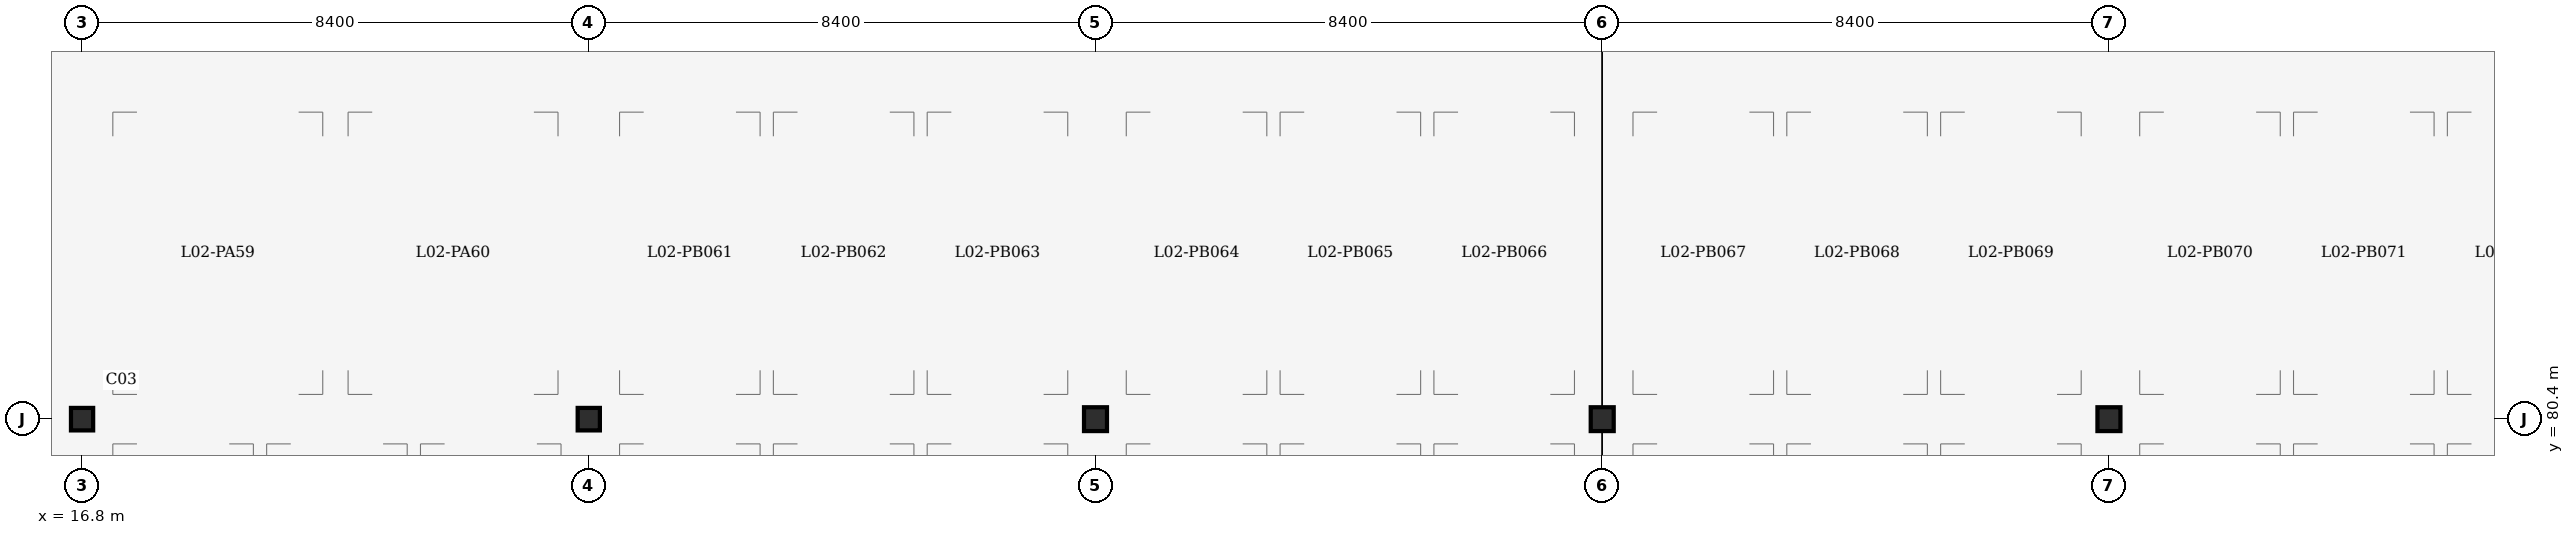
"""IFC4 building model, lengths in metres.
Left out: names, types, materials, properties, quantities, classifications, styles, units other than length and angle.
Written with IfcOpenShell. Run it as: python <this file> out.ifc"""

import sys

from ifc_helpers import new_model, si_unit, direction, frame, origin, origin_2d, place, context, subcontext, project, spatial, i_section, extrude, element, save


model = new_model("IFC4")
c1 = context("Model", 3, precision=1e-05, world=origin(), true_north=direction((0.0, 1.0)))
c2 = subcontext(c1, "Body", "Model", "MODEL_VIEW")
j1 = project(units=[si_unit("LENGTHUNIT", "METRE"), si_unit("PLANEANGLEUNIT", "RADIAN")], contexts=[c1])
p1 = place(None, origin())
s1 = spatial("IfcSite", under=j1, at=p1, CompositionType="ELEMENT")
p2 = place(p1, origin())
s2 = spatial("IfcBuilding", under=s1, at=p2, CompositionType="ELEMENT")
p3 = place(p2, frame((0.0, 0.0, 9.0)))
s3 = spatial("IfcBuildingStorey", under=s2, at=p3, CompositionType="ELEMENT", Elevation=9.0)
for number, where, z_axis, x_axis in (
    (1, (16.8, 80.4, 0.0), (0.0, 0.0, 1.0), (1.0, 0.0, 0.0)),
    (2, (25.2, 80.4, 0.0), (0.0, 0.0, 1.0), (1.0, 0.0, 0.0)),
):
    element("IfcColumn", number, at=place(p3, frame(where, z_axis=z_axis, x_axis=x_axis)), inside=s3, PredefinedType="COLUMN", context=c2, shape_type="SweptSolid", body=[
        extrude(i_section(OverallWidth=0.373, OverallDepth=0.368, WebThickness=0.014, FlangeThickness=0.024, FilletRadius=0.015, at=origin_2d()), origin(), (0.0, 0.0, 1.0), 3.6),
    ])
for number, where, z_axis, x_axis in (
    (3, (33.6, 80.4, 0.0), (0.0, 0.0, 1.0), (1.0, 0.0, 0.0)),
    (4, (42.0, 80.4, 0.0), (0.0, 0.0, 1.0), (1.0, 0.0, 0.0)),
    (5, (50.4, 80.4, 0.0), (0.0, 0.0, 1.0), (1.0, 0.0, 0.0)),
):
    element("IfcColumn", number, at=place(p3, frame(where, z_axis=z_axis, x_axis=x_axis)), inside=s3, PredefinedType="COLUMN", context=c2, shape_type="SweptSolid", body=[
        extrude(i_section(OverallWidth=0.395, OverallDepth=0.381, WebThickness=0.018, FlangeThickness=0.03, FilletRadius=0.015, at=origin_2d()), origin(), (0.0, 0.0, 1.0), 3.6),
    ])
save(model, sys.argv[1])
